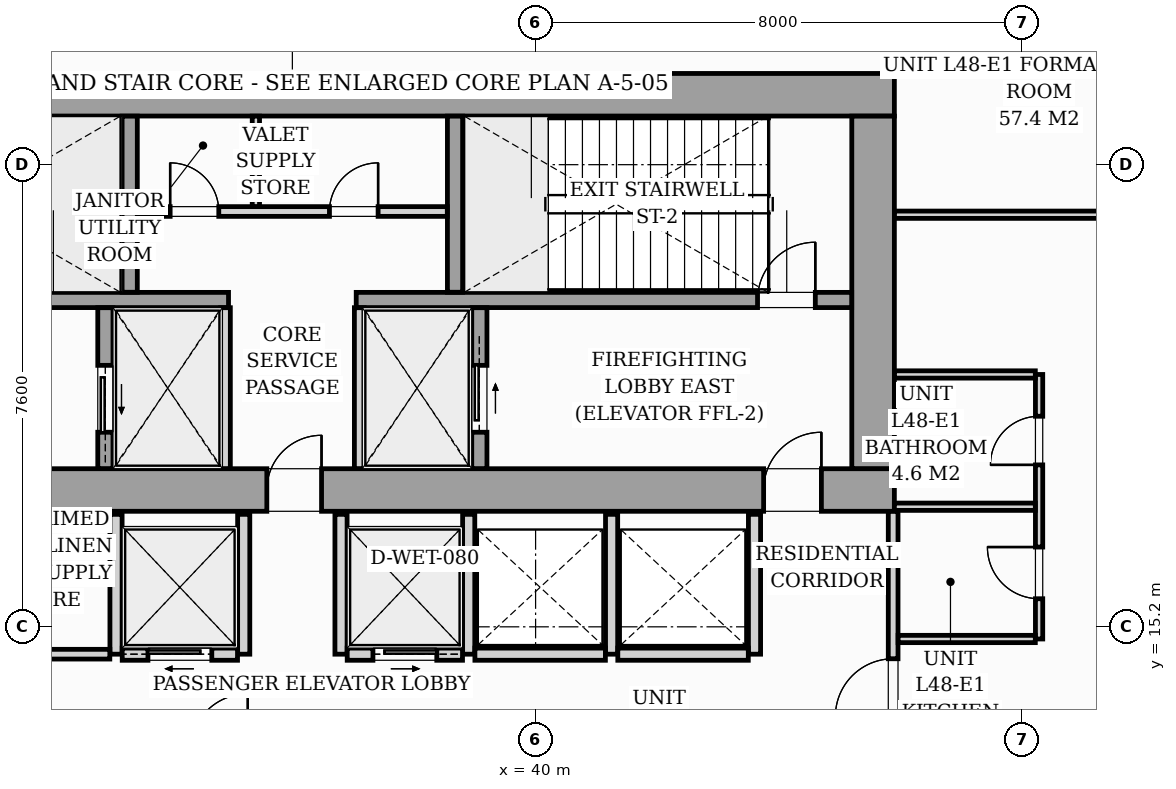
"""IFC4 building model, lengths in metres.
Left out: names, types, materials, properties, quantities, classifications, styles, units other than length and angle.
Written with IfcOpenShell. Run it as: python <this file> out.ifc"""

import sys

from ifc_helpers import new_model, si_unit, direction, frame, frame_2d, origin, origin_2d, place, context, subcontext, project, spatial, rectangle, i_section, extrude, source, transform, mapped, element, fill, save


model = new_model("IFC4")
c1 = context("Model", 3, precision=1e-05, world=origin(), true_north=direction((0.0, 1.0)))
c2 = subcontext(c1, "Body", "Model", "MODEL_VIEW")
j1 = project(units=[si_unit("LENGTHUNIT", "METRE"), si_unit("PLANEANGLEUNIT", "RADIAN")], contexts=[c1])
p1 = place(None, origin())
s1 = spatial("IfcSite", under=j1, at=p1, CompositionType="ELEMENT")
p2 = place(p1, origin())
s2 = spatial("IfcBuilding", under=s1, at=p2, CompositionType="ELEMENT")
p3 = place(p2, frame((0.0, 0.0, 167.8)))
s3 = spatial("IfcBuildingStorey", under=s2, at=p3, CompositionType="ELEMENT", Elevation=167.8)
m1 = source(origin(), c2, "Body", "SweptSolid", [
    extrude(i_section(OverallWidth=0.416, OverallDepth=0.446, WebThickness=0.039, FlangeThickness=0.063, FilletRadius=0.018, at=origin_2d()), origin(), (0.0, 0.0, 1.0), 5.196),
])
for number, where, z_axis, x_axis in (
    (1, (33.12, 17.4, 0.002), (0.0, 0.0, 1.0), (1.0, 0.0, 0.0)),
    (2, (38.88, 17.4, 0.002), (0.0, 0.0, 1.0), (1.0, 0.0, 0.0)),
    (3, (45.6, 17.4, 0.002), (0.0, 0.0, 1.0), (1.0, 0.0, 0.0)),
    (4, (33.12, 24.0, 0.002), (0.0, 0.0, 1.0), (1.0, 0.0, 0.0)),
    (5, (38.88, 24.0, 0.002), (0.0, 0.0, 1.0), (1.0, 0.0, 0.0)),
    (6, (45.6, 24.0, 0.002), (0.0, 0.0, 1.0), (1.0, 0.0, 0.0)),
):
    element("IfcColumn", number, at=place(p3, frame(where, z_axis=z_axis, x_axis=x_axis)), inside=s3, PredefinedType="PILASTER", context=c2, shape_type="MappedRepresentation", body=[
        mapped(m1, transform((0.0, 0.0, 0.0), scale=1.0)),
    ])
p4 = place(p3, frame((26.1, 17.45, 0.0), z_axis=(0.0, 0.0, 1.0), x_axis=(1.0, 0.0, 0.0)))
e7 = element("IfcWall", 7, at=p4, inside=s3, PredefinedType="SHEAR", context=c2, shape_type="SweptSolid", body=[
    extrude(rectangle(XDim=19.8, YDim=0.7, at=frame_2d((9.9, 0.0))), origin(), (0.0, 0.0, 1.0), 5.2),
])
p5 = place(p4, frame((1.05, 0.0, 0.0)))
e8 = element("IfcOpeningElement", 8, at=p5, cuts=e7, PredefinedType="OPENING", context=c2, shape_type="SweptSolid", body=[
    extrude(rectangle(XDim=0.95, YDim=2.06, at=frame_2d((0.475, 1.03))), frame((0.0, 0.36, 0.0), z_axis=(0.0, -1.0, 0.0), x_axis=(1.0, 0.0, 0.0)), (0.0, 0.0, 1.0), 0.72),
])
p6 = place(p4, frame((9.48, 0.0, 0.0)))
e9 = element("IfcOpeningElement", 9, at=p6, cuts=e7, PredefinedType="OPENING", context=c2, shape_type="SweptSolid", body=[
    extrude(rectangle(XDim=0.9, YDim=2.06, at=frame_2d((0.45, 1.03))), frame((0.0, 0.36, 0.0), z_axis=(0.0, -1.0, 0.0), x_axis=(1.0, 0.0, 0.0)), (0.0, 0.0, 1.0), 0.72),
])
p7 = place(p4, frame((17.65, 0.0, 0.0)))
e10 = element("IfcOpeningElement", 10, at=p7, cuts=e7, PredefinedType="OPENING", context=c2, shape_type="SweptSolid", body=[
    extrude(rectangle(XDim=0.95, YDim=2.06, at=frame_2d((0.475, 1.03))), frame((0.0, 0.36, 0.0), z_axis=(0.0, -1.0, 0.0), x_axis=(1.0, 0.0, 0.0)), (0.0, 0.0, 1.0), 0.72),
])
p8 = place(p3, frame((26.1, 23.95, 0.0), z_axis=(0.0, 0.0, 1.0), x_axis=(1.0, 0.0, 0.0)))
e11 = element("IfcWall", 11, at=p8, inside=s3, PredefinedType="SHEAR", context=c2, shape_type="SweptSolid", body=[
    extrude(rectangle(XDim=19.8, YDim=0.7, at=frame_2d((9.9, 0.0))), origin(), (0.0, 0.0, 1.0), 5.2),
])
p9 = place(p3, frame((45.55, 17.802, 0.0), z_axis=(0.0, 0.0, 1.0), x_axis=(0.0, 1.0, 0.0)))
e12 = element("IfcWall", 12, at=p9, inside=s3, PredefinedType="SHEAR", context=c2, shape_type="SweptSolid", body=[
    extrude(rectangle(XDim=5.796, YDim=0.7, at=frame_2d((2.898, 0.0))), origin(), (0.0, 0.0, 1.0), 5.2),
])
p10 = place(p3, frame((26.802, 20.575, 0.0), z_axis=(0.0, 0.0, 1.0), x_axis=(1.0, 0.0, 0.0)))
e13 = element("IfcWall", 13, at=p10, inside=s3, PredefinedType="SOLIDWALL", context=c2, shape_type="SweptSolid", body=[
    extrude(rectangle(XDim=8.148, YDim=0.25, at=frame_2d((4.074, 0.0))), origin(), (0.0, 0.0, 1.0), 5.2),
])
p11 = place(p10, frame((0.348, 0.0, 0.0)))
e14 = element("IfcOpeningElement", 14, at=p11, cuts=e13, PredefinedType="OPENING", context=c2, shape_type="SweptSolid", body=[
    extrude(rectangle(XDim=0.95, YDim=2.06, at=frame_2d((0.475, 1.03))), frame((0.0, 0.135, 0.0), z_axis=(0.0, -1.0, 0.0), x_axis=(1.0, 0.0, 0.0)), (0.0, 0.0, 1.0), 0.27),
])
p12 = place(p3, frame((37.05, 20.575, 0.0), z_axis=(0.0, 0.0, 1.0), x_axis=(1.0, 0.0, 0.0)))
e15 = element("IfcWall", 15, at=p12, inside=s3, PredefinedType="SOLIDWALL", context=c2, shape_type="SweptSolid", body=[
    extrude(rectangle(XDim=8.148, YDim=0.25, at=frame_2d((4.074, 0.0))), origin(), (0.0, 0.0, 1.0), 5.2),
])
p13 = place(p12, frame((6.6, 0.0, 0.0)))
e16 = element("IfcOpeningElement", 16, at=p13, cuts=e15, PredefinedType="OPENING", context=c2, shape_type="SweptSolid", body=[
    extrude(rectangle(XDim=0.95, YDim=2.06, at=frame_2d((0.475, 1.03))), frame((0.0, 0.135, 0.0), z_axis=(0.0, -1.0, 0.0), x_axis=(1.0, 0.0, 0.0)), (0.0, 0.0, 1.0), 0.27),
])
for number, where, z_axis, x_axis in (
    (17, (33.325, 20.702, 0.0), (0.0, 0.0, 1.0), (0.0, 1.0, 0.0)),
    (18, (38.675, 20.702, 0.0), (0.0, 0.0, 1.0), (0.0, 1.0, 0.0)),
):
    element("IfcWall", number, at=place(p3, frame(where, z_axis=z_axis, x_axis=x_axis)), inside=s3, PredefinedType="SOLIDWALL", context=c2, shape_type="SweptSolid", body=[
        extrude(rectangle(XDim=2.896, YDim=0.25, at=frame_2d((1.448, 0.0))), origin(), (0.0, 0.0, 1.0), 5.2),
    ])
p14 = place(p3, frame((32.925, 17.802, 0.0), z_axis=(0.0, 0.0, 1.0), x_axis=(0.0, 1.0, 0.0)))
e19 = element("IfcWall", 19, at=p14, inside=s3, PredefinedType="SOLIDWALL", context=c2, shape_type="SweptSolid", body=[
    extrude(rectangle(XDim=2.646, YDim=0.25, at=frame_2d((1.323, 0.0))), origin(), (0.0, 0.0, 1.0), 5.2),
])
p15 = place(p14, frame((0.598, 0.0, 0.0)))
e20 = element("IfcOpeningElement", 20, at=p15, cuts=e19, PredefinedType="OPENING", context=c2, shape_type="SweptSolid", body=[
    extrude(rectangle(XDim=1.1, YDim=2.08, at=frame_2d((0.55, 1.04))), frame((0.0, 0.135, 0.0), z_axis=(0.0, -1.0, 0.0), x_axis=(1.0, 0.0, 0.0)), (0.0, 0.0, 1.0), 0.27),
])
for number, where, z_axis, x_axis in (
    (21, (34.9, 17.802, 0.0), (0.0, 0.0, 1.0), (0.0, 1.0, 0.0)),
    (22, (37.1, 17.802, 0.0), (0.0, 0.0, 1.0), (0.0, 1.0, 0.0)),
):
    element("IfcWall", number, at=place(p3, frame(where, z_axis=z_axis, x_axis=x_axis)), inside=s3, PredefinedType="PARTITIONING", context=c2, shape_type="SweptSolid", body=[
        extrude(rectangle(XDim=2.646, YDim=0.16, at=frame_2d((1.323, 0.0))), origin(), (0.0, 0.0, 1.0), 4.94),
    ])
p16 = place(p3, frame((39.075, 17.802, 0.0), z_axis=(0.0, 0.0, 1.0), x_axis=(0.0, 1.0, 0.0)))
e23 = element("IfcWall", 23, at=p16, inside=s3, PredefinedType="SOLIDWALL", context=c2, shape_type="SweptSolid", body=[
    extrude(rectangle(XDim=2.646, YDim=0.25, at=frame_2d((1.323, 0.0))), origin(), (0.0, 0.0, 1.0), 5.2),
])
p17 = place(p16, frame((0.598, 0.0, 0.0)))
e24 = element("IfcOpeningElement", 24, at=p17, cuts=e23, PredefinedType="OPENING", context=c2, shape_type="SweptSolid", body=[
    extrude(rectangle(XDim=1.1, YDim=2.08, at=frame_2d((0.55, 1.04))), frame((0.0, 0.135, 0.0), z_axis=(0.0, -1.0, 0.0), x_axis=(1.0, 0.0, 0.0)), (0.0, 0.0, 1.0), 0.27),
])
p18 = place(p3, frame((33.452, 22.03, 0.0), z_axis=(0.0, 0.0, 1.0), x_axis=(1.0, 0.0, 0.0)))
e25 = element("IfcWall", 25, at=p18, inside=s3, PredefinedType="PARTITIONING", context=c2, shape_type="SweptSolid", body=[
    extrude(rectangle(XDim=5.096, YDim=0.16, at=frame_2d((2.548, 0.0))), origin(), (0.0, 0.0, 1.0), 4.94),
])
p19 = place(p18, frame((0.538, 0.0, 0.0)))
e26 = element("IfcOpeningElement", 26, at=p19, cuts=e25, PredefinedType="OPENING", context=c2, shape_type="SweptSolid", body=[
    extrude(rectangle(XDim=0.8, YDim=2.05, at=frame_2d((0.4, 1.025))), frame((0.0, 0.09, 0.0), z_axis=(0.0, -1.0, 0.0), x_axis=(1.0, 0.0, 0.0)), (0.0, 0.0, 1.0), 0.18),
])
p20 = place(p18, frame((3.158, 0.0, 0.0)))
e27 = element("IfcOpeningElement", 27, at=p20, cuts=e25, PredefinedType="OPENING", context=c2, shape_type="SweptSolid", body=[
    extrude(rectangle(XDim=0.8, YDim=2.05, at=frame_2d((0.4, 1.025))), frame((0.0, 0.09, 0.0), z_axis=(0.0, -1.0, 0.0), x_axis=(1.0, 0.0, 0.0)), (0.0, 0.0, 1.0), 0.18),
])
p21 = place(p3, frame((35.4, 22.112, 0.0), z_axis=(0.0, 0.0, 1.0), x_axis=(0.0, 1.0, 0.0)))
e28 = element("IfcWall", 28, at=p21, inside=s3, PredefinedType="PARTITIONING", context=c2, shape_type="SweptSolid", body=[
    extrude(rectangle(XDim=1.486, YDim=0.12, at=frame_2d((0.743, 0.0))), origin(), (0.0, 0.0, 1.0), 4.94),
])
p22 = place(p3, frame((33.1, 14.75, 0.0), z_axis=(0.0, 0.0, 1.0), x_axis=(0.0, 1.0, 0.0)))
e29 = element("IfcWall", 29, at=p22, inside=s3, PredefinedType="PARTITIONING", context=c2, shape_type="SweptSolid", body=[
    extrude(rectangle(XDim=2.3, YDim=0.2, at=frame_2d((1.15, 0.0))), origin(), (0.0, 0.0, 1.0), 4.94),
])
p23 = place(p3, frame((28.482, 14.75, 0.0), z_axis=(0.0, 0.0, 1.0), x_axis=(1.0, 0.0, 0.0)))
e30 = element("IfcWall", 30, at=p23, inside=s3, PredefinedType="PARTITIONING", context=c2, shape_type="SweptSolid", body=[
    extrude(rectangle(XDim=4.516, YDim=0.16, at=frame_2d((2.258, 0.0))), origin(), (0.0, 0.0, 1.0), 4.94),
])
p24 = place(p23, frame((1.868, 0.0, 0.0)))
e31 = element("IfcOpeningElement", 31, at=p24, cuts=e30, PredefinedType="OPENING", context=c2, shape_type="SweptSolid", body=[
    extrude(rectangle(XDim=0.8, YDim=2.05, at=frame_2d((0.4, 1.025))), frame((0.0, 0.09, 0.0), z_axis=(0.0, -1.0, 0.0), x_axis=(1.0, 0.0, 0.0)), (0.0, 0.0, 1.0), 0.18),
])
p25 = place(p3, frame((35.2, 14.75, 0.0), z_axis=(0.0, 0.0, 1.0), x_axis=(0.0, 1.0, 0.0)))
e32 = element("IfcWall", 32, at=p25, inside=s3, PredefinedType="PARTITIONING", context=c2, shape_type="SweptSolid", body=[
    extrude(rectangle(XDim=2.3, YDim=0.2, at=frame_2d((1.15, 0.0))), origin(), (0.0, 0.0, 1.0), 4.94),
])
p26 = place(p3, frame((33.202, 14.75, 0.0), z_axis=(0.0, 0.0, 1.0), x_axis=(1.0, 0.0, 0.0)))
e33 = element("IfcWall", 33, at=p26, inside=s3, PredefinedType="PARTITIONING", context=c2, shape_type="SweptSolid", body=[
    extrude(rectangle(XDim=1.896, YDim=0.2, at=frame_2d((0.948, 0.0))), origin(), (0.0, 0.0, 1.0), 4.94),
])
p27 = place(p26, frame((0.423, 0.0, 0.0)))
e34 = element("IfcOpeningElement", 34, at=p27, cuts=e33, PredefinedType="OPENING", context=c2, shape_type="SweptSolid", body=[
    extrude(rectangle(XDim=1.05, YDim=2.08, at=frame_2d((0.525, 1.04))), frame((0.0, 0.11, 0.0), z_axis=(0.0, -1.0, 0.0), x_axis=(1.0, 0.0, 0.0)), (0.0, 0.0, 1.0), 0.22),
])
for number, where, z_axis, x_axis in (
    (35, (36.8, 14.75, 0.0), (0.0, 0.0, 1.0), (0.0, 1.0, 0.0)),
    (36, (38.9, 14.75, 0.0), (0.0, 0.0, 1.0), (0.0, 1.0, 0.0)),
):
    element("IfcWall", number, at=place(p3, frame(where, z_axis=z_axis, x_axis=x_axis)), inside=s3, PredefinedType="PARTITIONING", context=c2, shape_type="SweptSolid", body=[
        extrude(rectangle(XDim=2.3, YDim=0.2, at=frame_2d((1.15, 0.0))), origin(), (0.0, 0.0, 1.0), 4.94),
    ])
p28 = place(p3, frame((36.902, 14.75, 0.0), z_axis=(0.0, 0.0, 1.0), x_axis=(1.0, 0.0, 0.0)))
e37 = element("IfcWall", 37, at=p28, inside=s3, PredefinedType="PARTITIONING", context=c2, shape_type="SweptSolid", body=[
    extrude(rectangle(XDim=1.896, YDim=0.2, at=frame_2d((0.948, 0.0))), origin(), (0.0, 0.0, 1.0), 4.94),
])
p29 = place(p28, frame((0.423, 0.0, 0.0)))
e38 = element("IfcOpeningElement", 38, at=p29, cuts=e37, PredefinedType="OPENING", context=c2, shape_type="SweptSolid", body=[
    extrude(rectangle(XDim=1.05, YDim=2.08, at=frame_2d((0.525, 1.04))), frame((0.0, 0.11, 0.0), z_axis=(0.0, -1.0, 0.0), x_axis=(1.0, 0.0, 0.0)), (0.0, 0.0, 1.0), 0.22),
])
for number, where, z_axis, x_axis in (
    (39, (41.25, 14.75, 0.0), (0.0, 0.0, 1.0), (0.0, 1.0, 0.0)),
    (40, (43.6, 14.75, 0.0), (0.0, 0.0, 1.0), (0.0, 1.0, 0.0)),
):
    element("IfcWall", number, at=place(p3, frame(where, z_axis=z_axis, x_axis=x_axis)), inside=s3, PredefinedType="PARTITIONING", context=c2, shape_type="SweptSolid", body=[
        extrude(rectangle(XDim=2.3, YDim=0.2, at=frame_2d((1.15, 0.0))), origin(), (0.0, 0.0, 1.0), 4.94),
    ])
for number, where, z_axis, x_axis in (
    (41, (39.002, 14.75, 0.0), (0.0, 0.0, 1.0), (1.0, 0.0, 0.0)),
    (42, (41.352, 14.75, 0.0), (0.0, 0.0, 1.0), (1.0, 0.0, 0.0)),
):
    element("IfcWall", number, at=place(p3, frame(where, z_axis=z_axis, x_axis=x_axis)), inside=s3, PredefinedType="PARTITIONING", context=c2, shape_type="SweptSolid", body=[
        extrude(rectangle(XDim=2.146, YDim=0.2, at=frame_2d((1.073, 0.0))), origin(), (0.0, 0.0, 1.0), 4.94),
    ])
p30 = place(p3, frame((45.88, 13.232, 0.0), z_axis=(0.0, 0.0, 1.0), x_axis=(0.0, 1.0, 0.0)))
e43 = element("IfcWall", 43, at=p30, inside=s3, PredefinedType="PARTITIONING", context=c2, shape_type="SweptSolid", body=[
    extrude(rectangle(XDim=3.866, YDim=0.16, at=frame_2d((1.933, 0.0))), origin(), (0.0, 0.0, 1.0), 4.94),
])
p31 = place(p30, frame((0.493, 0.0, 0.0)))
e44 = element("IfcOpeningElement", 44, at=p31, cuts=e43, PredefinedType="OPENING", context=c2, shape_type="SweptSolid", body=[
    extrude(rectangle(XDim=0.95, YDim=2.06, at=frame_2d((0.475, 1.03))), frame((0.0, 0.09, 0.0), z_axis=(0.0, -1.0, 0.0), x_axis=(1.0, 0.0, 0.0)), (0.0, 0.0, 1.0), 0.18),
])
p32 = place(p3, frame((48.28, 15.0, 0.0), z_axis=(0.0, 0.0, 1.0), x_axis=(0.0, 1.0, 0.0)))
e45 = element("IfcWall", 45, at=p32, inside=s3, PredefinedType="PARTITIONING", context=c2, shape_type="SweptSolid", body=[
    extrude(rectangle(XDim=4.35, YDim=0.12, at=frame_2d((2.175, 0.0))), origin(), (0.0, 0.0, 1.0), 4.94),
])
p33 = place(p32, frame((0.662, 0.0, 0.0)))
e46 = element("IfcOpeningElement", 46, at=p33, cuts=e45, PredefinedType="OPENING", context=c2, shape_type="SweptSolid", body=[
    extrude(rectangle(XDim=0.85, YDim=2.05, at=frame_2d((0.425, 1.025))), frame((0.0, 0.07, 0.0), z_axis=(0.0, -1.0, 0.0), x_axis=(1.0, 0.0, 0.0)), (0.0, 0.0, 1.0), 0.14),
])
p34 = place(p32, frame((2.863, 0.0, 0.0)))
e47 = element("IfcOpeningElement", 47, at=p34, cuts=e45, PredefinedType="OPENING", context=c2, shape_type="SweptSolid", body=[
    extrude(rectangle(XDim=0.8, YDim=2.02, at=frame_2d((0.4, 1.01))), frame((0.0, 0.07, 0.0), z_axis=(0.0, -1.0, 0.0), x_axis=(1.0, 0.0, 0.0)), (0.0, 0.0, 1.0), 0.14),
])
p35 = place(p3, frame((45.9, 17.175, 0.0), z_axis=(0.0, 0.0, 1.0), x_axis=(1.0, 0.0, 0.0)))
e48 = element("IfcWall", 48, at=p35, inside=s3, PredefinedType="PARTITIONING", context=c2, shape_type="SweptSolid", body=[
    extrude(rectangle(XDim=2.318, YDim=0.12, at=frame_2d((1.159, 0.0))), origin(), (0.0, 0.0, 1.0), 4.94),
])
p36 = place(p3, frame((45.962, 15.0, 0.0), z_axis=(0.0, 0.0, 1.0), x_axis=(1.0, 0.0, 0.0)))
e49 = element("IfcWall", 49, at=p36, inside=s3, PredefinedType="PARTITIONING", context=c2, shape_type="SweptSolid", body=[
    extrude(rectangle(XDim=2.256, YDim=0.12, at=frame_2d((1.128, 0.0))), origin(), (0.0, 0.0, 1.0), 4.94),
])
p37 = place(p3, frame((45.902, 19.35, 0.0), z_axis=(0.0, 0.0, 1.0), x_axis=(1.0, 0.0, 0.0)))
e50 = element("IfcWall", 50, at=p37, inside=s3, PredefinedType="PARTITIONING", context=c2, shape_type="SweptSolid", body=[
    extrude(rectangle(XDim=2.316, YDim=0.12, at=frame_2d((1.158, 0.0))), origin(), (0.0, 0.0, 1.0), 4.94),
])
p38 = place(p3, frame((45.902, 21.977, 0.0), z_axis=(0.0, 0.0, 1.0), x_axis=(1.0, 0.0, 0.0)))
e51 = element("IfcWall", 51, at=p38, inside=s3, PredefinedType="PARTITIONING", context=c2, shape_type="SweptSolid", body=[
    extrude(rectangle(XDim=18.404, YDim=0.12, at=frame_2d((9.202, 0.0))), origin(), (0.0, 0.0, 1.0), 4.94),
])
p39 = place(p38, frame((8.813, 0.0, 0.0)))
e52 = element("IfcOpeningElement", 52, at=p39, cuts=e51, PredefinedType="OPENING", context=c2, shape_type="SweptSolid", body=[
    extrude(rectangle(XDim=0.85, YDim=2.05, at=frame_2d((0.425, 1.025))), frame((0.0, 0.07, 0.0), z_axis=(0.0, -1.0, 0.0), x_axis=(1.0, 0.0, 0.0)), (0.0, 0.0, 1.0), 0.14),
])
m2 = source(origin(), c2, "Body", "SweptSolid", [
    extrude(rectangle(XDim=0.9, YDim=2.06, at=frame_2d((0.45, 1.03))), frame((0.0, 0.025, 0.0), z_axis=(0.0, -1.0, 0.0), x_axis=(1.0, 0.0, 0.0)), (0.0, 0.0, 1.0), 0.05),
])
p40 = place(p6, origin())
e53 = element("IfcDoor", 53, at=p40, inside=s3, OperationType="SINGLE_SWING_RIGHT", PredefinedType="DOOR", context=c2, shape_type="MappedRepresentation", body=[
    mapped(m2, transform((0.0, 0.0, 0.0), scale=1.0)),
])
fill(e9, e53)
m3 = source(origin(), c2, "Body", "SweptSolid", [
    extrude(rectangle(XDim=0.95, YDim=2.06, at=frame_2d((0.475, 1.03))), frame((0.0, 0.025, 0.0), z_axis=(0.0, -1.0, 0.0), x_axis=(1.0, 0.0, 0.0)), (0.0, 0.0, 1.0), 0.05),
])
p41 = place(p7, origin())
e54 = element("IfcDoor", 54, at=p41, inside=s3, OperationType="SINGLE_SWING_RIGHT", PredefinedType="DOOR", context=c2, shape_type="MappedRepresentation", body=[
    mapped(m3, transform((0.0, 0.0, 0.0), scale=1.0)),
])
fill(e10, e54)
p42 = place(p13, origin())
e55 = element("IfcDoor", 55, at=p42, inside=s3, OperationType="SINGLE_SWING_RIGHT", PredefinedType="DOOR", context=c2, shape_type="MappedRepresentation", body=[
    mapped(m3, transform((0.0, 0.0, 0.0), scale=1.0)),
])
fill(e16, e55)
m4 = source(origin(), c2, "Body", "SweptSolid", [
    extrude(rectangle(XDim=1.1, YDim=2.08, at=frame_2d((0.55, 1.04))), frame((0.0, 0.025, 0.0), z_axis=(0.0, -1.0, 0.0), x_axis=(1.0, 0.0, 0.0)), (0.0, 0.0, 1.0), 0.05),
])
p43 = place(p15, origin())
e56 = element("IfcDoor", 56, at=p43, inside=s3, OperationType="SLIDING_TO_LEFT", PredefinedType="DOOR", context=c2, shape_type="MappedRepresentation", body=[
    mapped(m4, transform((0.0, 0.0, 0.0), scale=1.0)),
])
fill(e20, e56)
p44 = place(p17, origin())
e57 = element("IfcDoor", 57, at=p44, inside=s3, OperationType="SLIDING_TO_RIGHT", PredefinedType="DOOR", context=c2, shape_type="MappedRepresentation", body=[
    mapped(m4, transform((0.0, 0.0, 0.0), scale=1.0)),
])
fill(e24, e57)
m5 = source(origin(), c2, "Body", "SweptSolid", [
    extrude(rectangle(XDim=0.8, YDim=2.05, at=frame_2d((0.4, 1.025))), frame((0.0, 0.025, 0.0), z_axis=(0.0, -1.0, 0.0), x_axis=(1.0, 0.0, 0.0)), (0.0, 0.0, 1.0), 0.05),
])
p45 = place(p19, origin())
e58 = element("IfcDoor", 58, at=p45, inside=s3, OperationType="SINGLE_SWING_LEFT", PredefinedType="DOOR", context=c2, shape_type="MappedRepresentation", body=[
    mapped(m5, transform((0.0, 0.0, 0.0), scale=1.0)),
])
fill(e26, e58)
p46 = place(p20, origin())
e59 = element("IfcDoor", 59, at=p46, inside=s3, OperationType="SINGLE_SWING_RIGHT", PredefinedType="DOOR", context=c2, shape_type="MappedRepresentation", body=[
    mapped(m5, transform((0.0, 0.0, 0.0), scale=1.0)),
])
fill(e27, e59)
m6 = source(origin(), c2, "Body", "SweptSolid", [
    extrude(rectangle(XDim=1.05, YDim=2.08, at=frame_2d((0.525, 1.04))), frame((0.0, 0.025, 0.0), z_axis=(0.0, -1.0, 0.0), x_axis=(1.0, 0.0, 0.0)), (0.0, 0.0, 1.0), 0.05),
])
p47 = place(p27, origin())
e60 = element("IfcDoor", 60, at=p47, inside=s3, OperationType="SLIDING_TO_LEFT", PredefinedType="DOOR", context=c2, shape_type="MappedRepresentation", body=[
    mapped(m6, transform((0.0, 0.0, 0.0), scale=1.0)),
])
fill(e34, e60)
p48 = place(p29, origin())
e61 = element("IfcDoor", 61, at=p48, inside=s3, OperationType="SLIDING_TO_RIGHT", PredefinedType="DOOR", context=c2, shape_type="MappedRepresentation", body=[
    mapped(m6, transform((0.0, 0.0, 0.0), scale=1.0)),
])
fill(e38, e61)
m7 = source(origin(), c2, "Body", "SweptSolid", [
    extrude(rectangle(XDim=0.95, YDim=2.06, at=frame_2d((0.475, 1.03))), frame((0.0, 0.025, 0.0), z_axis=(0.0, -1.0, 0.0), x_axis=(1.0, 0.0, 0.0)), (0.0, 0.0, 1.0), 0.05),
])
p49 = place(p31, origin())
e62 = element("IfcDoor", 62, at=p49, inside=s3, OperationType="SINGLE_SWING_LEFT", PredefinedType="DOOR", context=c2, shape_type="MappedRepresentation", body=[
    mapped(m7, transform((0.0, 0.0, 0.0), scale=1.0)),
])
fill(e44, e62)
m8 = source(origin(), c2, "Body", "SweptSolid", [
    extrude(rectangle(XDim=0.85, YDim=2.05, at=frame_2d((0.425, 1.025))), frame((0.0, 0.025, 0.0), z_axis=(0.0, -1.0, 0.0), x_axis=(1.0, 0.0, 0.0)), (0.0, 0.0, 1.0), 0.05),
])
p50 = place(p33, origin())
e63 = element("IfcDoor", 63, at=p50, inside=s3, OperationType="SINGLE_SWING_RIGHT", PredefinedType="DOOR", context=c2, shape_type="MappedRepresentation", body=[
    mapped(m8, transform((0.0, 0.0, 0.0), scale=1.0)),
])
fill(e46, e63)
m9 = source(origin(), c2, "Body", "SweptSolid", [
    extrude(rectangle(XDim=0.8, YDim=2.02, at=frame_2d((0.4, 1.01))), frame((0.0, 0.025, 0.0), z_axis=(0.0, -1.0, 0.0), x_axis=(1.0, 0.0, 0.0)), (0.0, 0.0, 1.0), 0.05),
])
p51 = place(p34, origin())
e64 = element("IfcDoor", 64, at=p51, inside=s3, OperationType="SINGLE_SWING_LEFT", PredefinedType="DOOR", context=c2, shape_type="MappedRepresentation", body=[
    mapped(m9, transform((0.0, 0.0, 0.0), scale=1.0)),
])
fill(e47, e64)
save(model, sys.argv[1])
